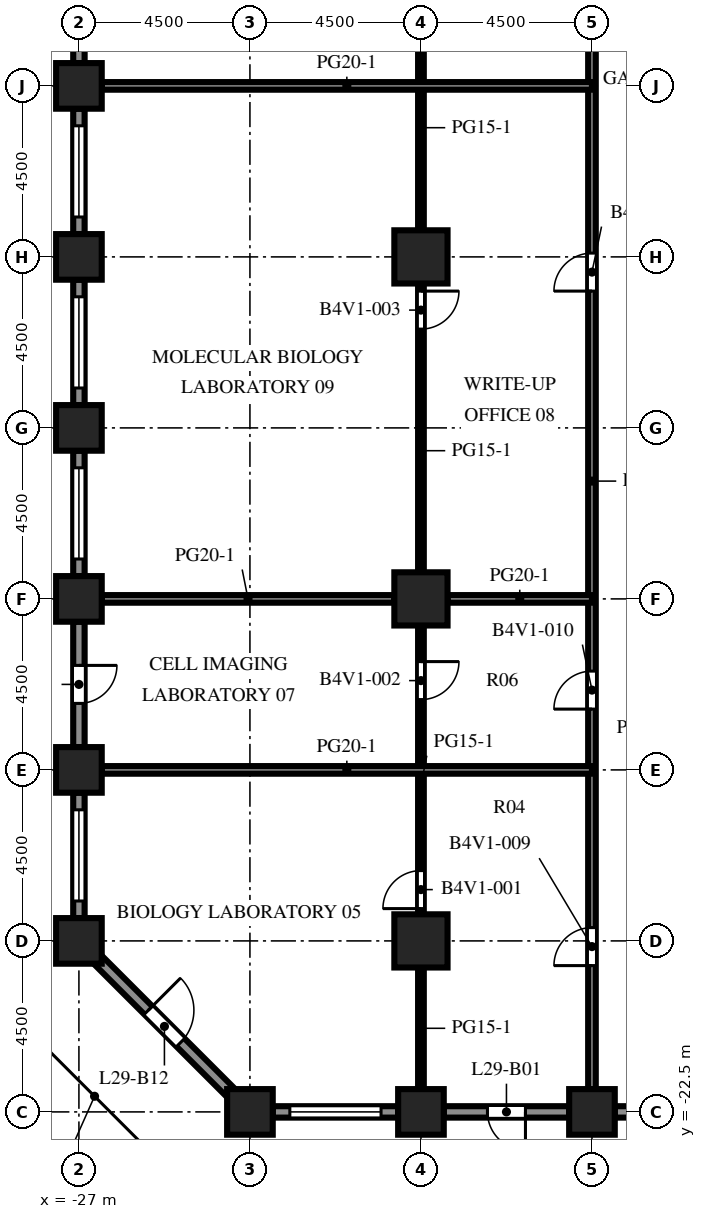
"""IFC4 building model, lengths in metres.
Left out: names, types, materials, properties, quantities, classifications, styles, units other than length and angle.
Written with IfcOpenShell. Run it as: python <this file> out.ifc"""

import sys

from ifc_helpers import new_model, si_unit, direction, frame, frame_2d, origin, origin_2d, place, context, subcontext, project, spatial, rectangle, extrude, element, fill, save


model = new_model("IFC4")
c1 = context("Model", 3, precision=1e-05, world=origin(), true_north=direction((0.0, 1.0)))
c2 = subcontext(c1, "Body", "Model", "MODEL_VIEW")
j1 = project(units=[si_unit("LENGTHUNIT", "METRE"), si_unit("PLANEANGLEUNIT", "RADIAN")], contexts=[c1])
p1 = place(None, origin())
s1 = spatial("IfcSite", under=j1, at=p1, CompositionType="ELEMENT")
p2 = place(p1, origin())
s2 = spatial("IfcBuilding", under=s1, at=p2, CompositionType="ELEMENT")
p3 = place(p2, frame((0.0, 0.0, 129.0)))
s3 = spatial("IfcBuildingStorey", under=s2, at=p3, CompositionType="ELEMENT", Elevation=129.0)
for number, where, z_axis, x_axis in (
    (1, (-27.0, -18.0, 0.0), (0.0, 0.0, 1.0), (1.0, 0.0, 0.0)),
    (2, (-27.0, -13.5, 0.0), (0.0, 0.0, 1.0), (1.0, 0.0, 0.0)),
    (3, (-27.0, -9.0, 0.0), (0.0, 0.0, 1.0), (1.0, 0.0, 0.0)),
    (4, (-27.0, -4.5, 0.0), (0.0, 0.0, 1.0), (1.0, 0.0, 0.0)),
    (5, (-27.0, 0.0, 0.0), (0.0, 0.0, 1.0), (1.0, 0.0, 0.0)),
    (6, (-27.0, 4.5, 0.0), (0.0, 0.0, 1.0), (1.0, 0.0, 0.0)),
    (7, (-22.5, -22.5, 0.0), (0.0, 0.0, 1.0), (1.0, 0.0, 0.0)),
    (8, (-18.0, -22.5, 0.0), (0.0, 0.0, 1.0), (1.0, 0.0, 0.0)),
    (9, (-13.5, -22.5, 0.0), (0.0, 0.0, 1.0), (1.0, 0.0, 0.0)),
):
    element("IfcColumn", number, at=place(p3, frame(where, z_axis=z_axis, x_axis=x_axis)), inside=s3, PredefinedType="COLUMN", context=c2, shape_type="SweptSolid", body=[
        extrude(rectangle(XDim=1.2, YDim=1.2, at=origin_2d()), origin(), (0.0, 0.0, 1.0), 4.1),
    ])
for number, where, z_axis, x_axis in (
    (10, (-18.0, -18.0, 0.0), (0.0, 0.0, 1.0), (1.0, 0.0, 0.0)),
    (11, (-18.0, -9.0, 0.0), (0.0, 0.0, 1.0), (1.0, 0.0, 0.0)),
    (12, (-18.0, 0.0, 0.0), (0.0, 0.0, 1.0), (1.0, 0.0, 0.0)),
):
    element("IfcColumn", number, at=place(p3, frame(where, z_axis=z_axis, x_axis=x_axis)), inside=s3, PredefinedType="COLUMN", context=c2, shape_type="SweptSolid", body=[
        extrude(rectangle(XDim=1.4, YDim=1.4, at=origin_2d()), origin(), (0.0, 0.0, 1.0), 4.1),
    ])
p4 = place(p3, frame((-18.6, -22.5, 0.0), z_axis=(0.0, 0.0, 1.0), x_axis=(-1.0, 0.0, 0.0)))
e13 = element("IfcWall", 13, at=p4, inside=s3, PredefinedType="SOLIDWALL", context=c2, shape_type="SweptSolid", body=[
    extrude(rectangle(XDim=3.3, YDim=0.3, at=frame_2d((1.65, 0.0))), origin(), (0.0, 0.0, 1.0), 2.75),
])
p5 = place(p4, frame((0.45, 0.0, 0.8)))
e14 = element("IfcOpeningElement", 14, at=p5, cuts=e13, PredefinedType="OPENING", context=c2, shape_type="SweptSolid", body=[
    extrude(rectangle(XDim=2.4, YDim=1.7, at=frame_2d((1.2, 0.85))), frame((0.0, 0.16, 0.0), z_axis=(0.0, -1.0, 0.0), x_axis=(1.0, 0.0, 0.0)), (0.0, 0.0, 1.0), 0.32),
])
p6 = place(p3, frame((-14.1, -22.5, 0.0), z_axis=(0.0, 0.0, 1.0), x_axis=(-1.0, 0.0, 0.0)))
e15 = element("IfcWall", 15, at=p6, inside=s3, PredefinedType="SOLIDWALL", context=c2, shape_type="SweptSolid", body=[
    extrude(rectangle(XDim=3.3, YDim=0.3, at=frame_2d((1.65, 0.0))), origin(), (0.0, 0.0, 1.0), 2.75),
])
p7 = place(p6, frame((1.15, 0.0, 0.0)))
e16 = element("IfcOpeningElement", 16, at=p7, cuts=e15, PredefinedType="OPENING", context=c2, shape_type="SweptSolid", body=[
    extrude(rectangle(XDim=1.0, YDim=2.2, at=frame_2d((0.5, 1.1))), frame((0.0, 0.16, 0.0), z_axis=(0.0, -1.0, 0.0), x_axis=(1.0, 0.0, 0.0)), (0.0, 0.0, 1.0), 0.32),
])
p8 = place(p3, frame((-9.6, -22.5, 0.0), z_axis=(0.0, 0.0, 1.0), x_axis=(-1.0, 0.0, 0.0)))
e17 = element("IfcWall", 17, at=p8, inside=s3, PredefinedType="SOLIDWALL", context=c2, shape_type="SweptSolid", body=[
    extrude(rectangle(XDim=3.3, YDim=0.3, at=frame_2d((1.65, 0.0))), origin(), (0.0, 0.0, 1.0), 2.75),
])
p9 = place(p8, frame((1.575, 0.0, 0.8)))
e18 = element("IfcOpeningElement", 18, at=p9, cuts=e17, PredefinedType="OPENING", context=c2, shape_type="SweptSolid", body=[
    extrude(rectangle(XDim=1.2, YDim=1.7, at=frame_2d((0.6, 0.85))), frame((0.0, 0.16, 0.0), z_axis=(0.0, -1.0, 0.0), x_axis=(1.0, 0.0, 0.0)), (0.0, 0.0, 1.0), 0.32),
])
p10 = place(p3, frame((-27.0, 5.1, 0.0), z_axis=(0.0, 0.0, 1.0), x_axis=(0.0, 1.0, 0.0)))
e19 = element("IfcWall", 19, at=p10, inside=s3, PredefinedType="SOLIDWALL", context=c2, shape_type="SweptSolid", body=[
    extrude(rectangle(XDim=3.3, YDim=0.3, at=frame_2d((1.65, 0.0))), origin(), (0.0, 0.0, 1.0), 2.75),
])
p11 = place(p10, frame((0.45, 0.0, 0.8)))
e20 = element("IfcOpeningElement", 20, at=p11, cuts=e19, PredefinedType="OPENING", context=c2, shape_type="SweptSolid", body=[
    extrude(rectangle(XDim=2.4, YDim=1.7, at=frame_2d((1.2, 0.85))), frame((0.0, 0.16, 0.0), z_axis=(0.0, -1.0, 0.0), x_axis=(1.0, 0.0, 0.0)), (0.0, 0.0, 1.0), 0.32),
])
p12 = place(p3, frame((-27.0, 0.6, 0.0), z_axis=(0.0, 0.0, 1.0), x_axis=(0.0, 1.0, 0.0)))
e21 = element("IfcWall", 21, at=p12, inside=s3, PredefinedType="SOLIDWALL", context=c2, shape_type="SweptSolid", body=[
    extrude(rectangle(XDim=3.3, YDim=0.3, at=frame_2d((1.65, 0.0))), origin(), (0.0, 0.0, 1.0), 2.75),
])
p13 = place(p12, frame((0.45, 0.0, 0.8)))
e22 = element("IfcOpeningElement", 22, at=p13, cuts=e21, PredefinedType="OPENING", context=c2, shape_type="SweptSolid", body=[
    extrude(rectangle(XDim=2.4, YDim=1.7, at=frame_2d((1.2, 0.85))), frame((0.0, 0.16, 0.0), z_axis=(0.0, -1.0, 0.0), x_axis=(1.0, 0.0, 0.0)), (0.0, 0.0, 1.0), 0.32),
])
p14 = place(p3, frame((-27.0, -3.9, 0.0), z_axis=(0.0, 0.0, 1.0), x_axis=(0.0, 1.0, 0.0)))
e23 = element("IfcWall", 23, at=p14, inside=s3, PredefinedType="SOLIDWALL", context=c2, shape_type="SweptSolid", body=[
    extrude(rectangle(XDim=3.3, YDim=0.3, at=frame_2d((1.65, 0.0))), origin(), (0.0, 0.0, 1.0), 2.75),
])
p15 = place(p14, frame((0.45, 0.0, 0.8)))
e24 = element("IfcOpeningElement", 24, at=p15, cuts=e23, PredefinedType="OPENING", context=c2, shape_type="SweptSolid", body=[
    extrude(rectangle(XDim=2.4, YDim=1.7, at=frame_2d((1.2, 0.85))), frame((0.0, 0.16, 0.0), z_axis=(0.0, -1.0, 0.0), x_axis=(1.0, 0.0, 0.0)), (0.0, 0.0, 1.0), 0.32),
])
p16 = place(p3, frame((-27.0, -8.4, 0.0), z_axis=(0.0, 0.0, 1.0), x_axis=(0.0, 1.0, 0.0)))
e25 = element("IfcWall", 25, at=p16, inside=s3, PredefinedType="SOLIDWALL", context=c2, shape_type="SweptSolid", body=[
    extrude(rectangle(XDim=3.3, YDim=0.3, at=frame_2d((1.65, 0.0))), origin(), (0.0, 0.0, 1.0), 2.75),
])
p17 = place(p16, frame((0.45, 0.0, 0.8)))
e26 = element("IfcOpeningElement", 26, at=p17, cuts=e25, PredefinedType="OPENING", context=c2, shape_type="SweptSolid", body=[
    extrude(rectangle(XDim=2.4, YDim=1.7, at=frame_2d((1.2, 0.85))), frame((0.0, 0.16, 0.0), z_axis=(0.0, -1.0, 0.0), x_axis=(1.0, 0.0, 0.0)), (0.0, 0.0, 1.0), 0.32),
])
p18 = place(p3, frame((-27.0, -12.9, 0.0), z_axis=(0.0, 0.0, 1.0), x_axis=(0.0, 1.0, 0.0)))
e27 = element("IfcWall", 27, at=p18, inside=s3, PredefinedType="SOLIDWALL", context=c2, shape_type="SweptSolid", body=[
    extrude(rectangle(XDim=3.3, YDim=0.3, at=frame_2d((1.65, 0.0))), origin(), (0.0, 0.0, 1.0), 2.75),
])
p19 = place(p18, frame((1.15, 0.0, 0.0)))
e28 = element("IfcOpeningElement", 28, at=p19, cuts=e27, PredefinedType="OPENING", context=c2, shape_type="SweptSolid", body=[
    extrude(rectangle(XDim=1.0, YDim=2.2, at=frame_2d((0.5, 1.1))), frame((0.0, 0.16, 0.0), z_axis=(0.0, -1.0, 0.0), x_axis=(1.0, 0.0, 0.0)), (0.0, 0.0, 1.0), 0.32),
])
p20 = place(p3, frame((-27.0, -17.4, 0.0), z_axis=(0.0, 0.0, 1.0), x_axis=(0.0, 1.0, 0.0)))
e29 = element("IfcWall", 29, at=p20, inside=s3, PredefinedType="SOLIDWALL", context=c2, shape_type="SweptSolid", body=[
    extrude(rectangle(XDim=3.3, YDim=0.3, at=frame_2d((1.65, 0.0))), origin(), (0.0, 0.0, 1.0), 2.75),
])
p21 = place(p20, frame((0.45, 0.0, 0.8)))
e30 = element("IfcOpeningElement", 30, at=p21, cuts=e29, PredefinedType="OPENING", context=c2, shape_type="SweptSolid", body=[
    extrude(rectangle(XDim=2.4, YDim=1.7, at=frame_2d((1.2, 0.85))), frame((0.0, 0.16, 0.0), z_axis=(0.0, -1.0, 0.0), x_axis=(1.0, 0.0, 0.0)), (0.0, 0.0, 1.0), 0.32),
])
p22 = place(p3, frame((-22.994, -22.006, 0.0), z_axis=(0.0, 0.0, 1.0), x_axis=(-0.707106781187, 0.707106781187, 0.0)))
e31 = element("IfcWall", 31, at=p22, inside=s3, PredefinedType="SOLIDWALL", context=c2, shape_type="SweptSolid", body=[
    extrude(rectangle(XDim=4.967, YDim=0.3, at=frame_2d((2.483, 0.0))), origin(), (0.0, 0.0, 1.0), 2.75),
])
p23 = place(p22, frame((1.884, 0.0, 0.0)))
e32 = element("IfcOpeningElement", 32, at=p23, cuts=e31, PredefinedType="OPENING", context=c2, shape_type="SweptSolid", body=[
    extrude(rectangle(XDim=1.2, YDim=2.2, at=frame_2d((0.6, 1.1))), frame((0.0, 0.16, 0.0), z_axis=(0.0, -1.0, 0.0), x_axis=(1.0, 0.0, 0.0)), (0.0, 0.0, 1.0), 0.32),
])
p24 = place(p3, frame((-18.0, -21.9, 0.0), z_axis=(0.0, 0.0, 1.0), x_axis=(0.0, 1.0, 0.0)))
e33 = element("IfcWall", 33, at=p24, inside=s3, PredefinedType="PARTITIONING", context=c2, shape_type="SweptSolid", body=[
    extrude(rectangle(XDim=3.2, YDim=0.15, at=frame_2d((1.6, 0.0))), origin(), (0.0, 0.0, 1.0), 3.65),
])
p25 = place(p3, frame((-18.0, -17.3, 0.0), z_axis=(0.0, 0.0, 1.0), x_axis=(0.0, 1.0, 0.0)))
e34 = element("IfcWall", 34, at=p25, inside=s3, PredefinedType="PARTITIONING", context=c2, shape_type="SweptSolid", body=[
    extrude(rectangle(XDim=7.6, YDim=0.15, at=frame_2d((3.8, 0.0))), origin(), (0.0, 0.0, 1.0), 3.65),
])
p26 = place(p25, frame((0.15, 0.0, 0.0)))
e35 = element("IfcOpeningElement", 35, at=p26, cuts=e34, PredefinedType="OPENING", context=c2, shape_type="SweptSolid", body=[
    extrude(rectangle(XDim=1.0, YDim=2.1, at=frame_2d((0.5, 1.05))), frame((0.0, 0.085, 0.0), z_axis=(0.0, -1.0, 0.0), x_axis=(1.0, 0.0, 0.0)), (0.0, 0.0, 1.0), 0.17),
])
p27 = place(p25, frame((5.65, 0.0, 0.0)))
e36 = element("IfcOpeningElement", 36, at=p27, cuts=e34, PredefinedType="OPENING", context=c2, shape_type="SweptSolid", body=[
    extrude(rectangle(XDim=1.0, YDim=2.1, at=frame_2d((0.5, 1.05))), frame((0.0, 0.085, 0.0), z_axis=(0.0, -1.0, 0.0), x_axis=(1.0, 0.0, 0.0)), (0.0, 0.0, 1.0), 0.17),
])
p28 = place(p3, frame((-18.0, -8.3, 0.0), z_axis=(0.0, 0.0, 1.0), x_axis=(0.0, 1.0, 0.0)))
e37 = element("IfcWall", 37, at=p28, inside=s3, PredefinedType="PARTITIONING", context=c2, shape_type="SweptSolid", body=[
    extrude(rectangle(XDim=7.6, YDim=0.15, at=frame_2d((3.8, 0.0))), origin(), (0.0, 0.0, 1.0), 3.65),
])
p29 = place(p28, frame((6.4, 0.0, 0.0)))
e38 = element("IfcOpeningElement", 38, at=p29, cuts=e37, PredefinedType="OPENING", context=c2, shape_type="SweptSolid", body=[
    extrude(rectangle(XDim=1.0, YDim=2.1, at=frame_2d((0.5, 1.05))), frame((0.0, 0.085, 0.0), z_axis=(0.0, -1.0, 0.0), x_axis=(1.0, 0.0, 0.0)), (0.0, 0.0, 1.0), 0.17),
])
p30 = place(p3, frame((-18.0, 0.7, 0.0), z_axis=(0.0, 0.0, 1.0), x_axis=(0.0, 1.0, 0.0)))
e39 = element("IfcWall", 39, at=p30, inside=s3, PredefinedType="PARTITIONING", context=c2, shape_type="SweptSolid", body=[
    extrude(rectangle(XDim=7.6, YDim=0.15, at=frame_2d((3.8, 0.0))), origin(), (0.0, 0.0, 1.0), 3.65),
])
p31 = place(p30, frame((5.4, 0.0, 0.0)))
e40 = element("IfcOpeningElement", 40, at=p31, cuts=e39, PredefinedType="OPENING", context=c2, shape_type="SweptSolid", body=[
    extrude(rectangle(XDim=1.0, YDim=2.1, at=frame_2d((0.5, 1.05))), frame((0.0, 0.085, 0.0), z_axis=(0.0, -1.0, 0.0), x_axis=(1.0, 0.0, 0.0)), (0.0, 0.0, 1.0), 0.17),
])
p32 = place(p3, frame((-13.5, -21.9, 0.0), z_axis=(0.0, 0.0, 1.0), x_axis=(0.0, 1.0, 0.0)))
e41 = element("IfcWall", 41, at=p32, inside=s3, PredefinedType="PARTITIONING", context=c2, shape_type="SweptSolid", body=[
    extrude(rectangle(XDim=52.8, YDim=0.2, at=frame_2d((26.4, 0.0))), origin(), (0.0, 0.0, 1.0), 3.65),
])
p33 = place(p32, frame((3.25, 0.0, 0.0)))
e42 = element("IfcOpeningElement", 42, at=p33, cuts=e41, PredefinedType="OPENING", context=c2, shape_type="SweptSolid", body=[
    extrude(rectangle(XDim=1.0, YDim=2.1, at=frame_2d((0.5, 1.05))), frame((0.0, 0.11, 0.0), z_axis=(0.0, -1.0, 0.0), x_axis=(1.0, 0.0, 0.0)), (0.0, 0.0, 1.0), 0.22),
])
p34 = place(p32, frame((10.0, 0.0, 0.0)))
e43 = element("IfcOpeningElement", 43, at=p34, cuts=e41, PredefinedType="OPENING", context=c2, shape_type="SweptSolid", body=[
    extrude(rectangle(XDim=1.0, YDim=2.1, at=frame_2d((0.5, 1.05))), frame((0.0, 0.11, 0.0), z_axis=(0.0, -1.0, 0.0), x_axis=(1.0, 0.0, 0.0)), (0.0, 0.0, 1.0), 0.22),
])
p35 = place(p32, frame((21.0, 0.0, 0.0)))
e44 = element("IfcOpeningElement", 44, at=p35, cuts=e41, PredefinedType="OPENING", context=c2, shape_type="SweptSolid", body=[
    extrude(rectangle(XDim=1.0, YDim=2.1, at=frame_2d((0.5, 1.05))), frame((0.0, 0.11, 0.0), z_axis=(0.0, -1.0, 0.0), x_axis=(1.0, 0.0, 0.0)), (0.0, 0.0, 1.0), 0.22),
])
p36 = place(p32, frame((27.75, 0.0, 0.0)))
e45 = element("IfcOpeningElement", 45, at=p36, cuts=e41, PredefinedType="OPENING", context=c2, shape_type="SweptSolid", body=[
    extrude(rectangle(XDim=1.0, YDim=2.1, at=frame_2d((0.5, 1.05))), frame((0.0, 0.11, 0.0), z_axis=(0.0, -1.0, 0.0), x_axis=(1.0, 0.0, 0.0)), (0.0, 0.0, 1.0), 0.22),
])
p37 = place(p32, frame((34.75, 0.0, 0.0)))
e46 = element("IfcOpeningElement", 46, at=p37, cuts=e41, PredefinedType="OPENING", context=c2, shape_type="SweptSolid", body=[
    extrude(rectangle(XDim=1.0, YDim=2.1, at=frame_2d((0.5, 1.05))), frame((0.0, 0.11, 0.0), z_axis=(0.0, -1.0, 0.0), x_axis=(1.0, 0.0, 0.0)), (0.0, 0.0, 1.0), 0.22),
])
p38 = place(p32, frame((42.0, 0.0, 0.0)))
e47 = element("IfcOpeningElement", 47, at=p38, cuts=e41, PredefinedType="OPENING", context=c2, shape_type="SweptSolid", body=[
    extrude(rectangle(XDim=1.0, YDim=2.1, at=frame_2d((0.5, 1.05))), frame((0.0, 0.11, 0.0), z_axis=(0.0, -1.0, 0.0), x_axis=(1.0, 0.0, 0.0)), (0.0, 0.0, 1.0), 0.22),
])
p39 = place(p32, frame((46.25, 0.0, 0.0)))
e48 = element("IfcOpeningElement", 48, at=p39, cuts=e41, PredefinedType="OPENING", context=c2, shape_type="SweptSolid", body=[
    extrude(rectangle(XDim=1.0, YDim=2.1, at=frame_2d((0.5, 1.05))), frame((0.0, 0.11, 0.0), z_axis=(0.0, -1.0, 0.0), x_axis=(1.0, 0.0, 0.0)), (0.0, 0.0, 1.0), 0.22),
])
p40 = place(p32, frame((51.0, 0.0, 0.0)))
e49 = element("IfcOpeningElement", 49, at=p40, cuts=e41, PredefinedType="OPENING", context=c2, shape_type="SweptSolid", body=[
    extrude(rectangle(XDim=1.0, YDim=2.1, at=frame_2d((0.5, 1.05))), frame((0.0, 0.11, 0.0), z_axis=(0.0, -1.0, 0.0), x_axis=(1.0, 0.0, 0.0)), (0.0, 0.0, 1.0), 0.22),
])
p41 = place(p3, frame((-26.4, -13.5, 0.0), z_axis=(0.0, 0.0, 1.0), x_axis=(1.0, 0.0, 0.0)))
e50 = element("IfcWall", 50, at=p41, inside=s3, PredefinedType="PARTITIONING", context=c2, shape_type="SweptSolid", body=[
    extrude(rectangle(XDim=12.9, YDim=0.2, at=frame_2d((6.45, 0.0))), origin(), (0.0, 0.0, 1.0), 3.65),
])
p42 = place(p3, frame((-26.4, -9.0, 0.0), z_axis=(0.0, 0.0, 1.0), x_axis=(1.0, 0.0, 0.0)))
e51 = element("IfcWall", 51, at=p42, inside=s3, PredefinedType="PARTITIONING", context=c2, shape_type="SweptSolid", body=[
    extrude(rectangle(XDim=7.7, YDim=0.2, at=frame_2d((3.85, 0.0))), origin(), (0.0, 0.0, 1.0), 3.65),
])
p43 = place(p3, frame((-17.3, -9.0, 0.0), z_axis=(0.0, 0.0, 1.0), x_axis=(1.0, 0.0, 0.0)))
e52 = element("IfcWall", 52, at=p43, inside=s3, PredefinedType="PARTITIONING", context=c2, shape_type="SweptSolid", body=[
    extrude(rectangle(XDim=3.8, YDim=0.2, at=frame_2d((1.9, 0.0))), origin(), (0.0, 0.0, 1.0), 3.65),
])
p44 = place(p3, frame((-26.4, 4.5, 0.0), z_axis=(0.0, 0.0, 1.0), x_axis=(1.0, 0.0, 0.0)))
e53 = element("IfcWall", 53, at=p44, inside=s3, PredefinedType="PARTITIONING", context=c2, shape_type="SweptSolid", body=[
    extrude(rectangle(XDim=12.9, YDim=0.2, at=frame_2d((6.45, 0.0))), origin(), (0.0, 0.0, 1.0), 3.65),
])
p45 = place(p5, origin())
e54 = element("IfcWindow", 54, at=p45, inside=s3, PartitioningType="SINGLE_PANEL", PredefinedType="WINDOW", context=c2, shape_type="SweptSolid", body=[
    extrude(rectangle(XDim=2.4, YDim=1.7, at=frame_2d((1.2, 0.85))), frame((0.0, 0.03, 0.0), z_axis=(0.0, -1.0, 0.0), x_axis=(1.0, 0.0, 0.0)), (0.0, 0.0, 1.0), 0.06),
])
fill(e14, e54)
p46 = place(p7, origin())
e55 = element("IfcDoor", 55, at=p46, inside=s3, OperationType="SINGLE_SWING_LEFT", PredefinedType="DOOR", context=c2, shape_type="SweptSolid", body=[
    extrude(rectangle(XDim=1.0, YDim=2.2, at=frame_2d((0.5, 1.1))), frame((0.0, 0.025, 0.0), z_axis=(0.0, -1.0, 0.0), x_axis=(1.0, 0.0, 0.0)), (0.0, 0.0, 1.0), 0.05),
])
fill(e16, e55)
p47 = place(p13, origin())
e56 = element("IfcWindow", 56, at=p47, inside=s3, PartitioningType="SINGLE_PANEL", PredefinedType="WINDOW", context=c2, shape_type="SweptSolid", body=[
    extrude(rectangle(XDim=2.4, YDim=1.7, at=frame_2d((1.2, 0.85))), frame((0.0, 0.03, 0.0), z_axis=(0.0, -1.0, 0.0), x_axis=(1.0, 0.0, 0.0)), (0.0, 0.0, 1.0), 0.06),
])
fill(e22, e56)
p48 = place(p15, origin())
e57 = element("IfcWindow", 57, at=p48, inside=s3, PartitioningType="SINGLE_PANEL", PredefinedType="WINDOW", context=c2, shape_type="SweptSolid", body=[
    extrude(rectangle(XDim=2.4, YDim=1.7, at=frame_2d((1.2, 0.85))), frame((0.0, 0.03, 0.0), z_axis=(0.0, -1.0, 0.0), x_axis=(1.0, 0.0, 0.0)), (0.0, 0.0, 1.0), 0.06),
])
fill(e24, e57)
p49 = place(p17, origin())
e58 = element("IfcWindow", 58, at=p49, inside=s3, PartitioningType="SINGLE_PANEL", PredefinedType="WINDOW", context=c2, shape_type="SweptSolid", body=[
    extrude(rectangle(XDim=2.4, YDim=1.7, at=frame_2d((1.2, 0.85))), frame((0.0, 0.03, 0.0), z_axis=(0.0, -1.0, 0.0), x_axis=(1.0, 0.0, 0.0)), (0.0, 0.0, 1.0), 0.06),
])
fill(e26, e58)
p50 = place(p19, origin())
e59 = element("IfcDoor", 59, at=p50, inside=s3, OperationType="SINGLE_SWING_RIGHT", PredefinedType="DOOR", context=c2, shape_type="SweptSolid", body=[
    extrude(rectangle(XDim=1.0, YDim=2.2, at=frame_2d((0.5, 1.1))), frame((0.0, 0.025, 0.0), z_axis=(0.0, -1.0, 0.0), x_axis=(1.0, 0.0, 0.0)), (0.0, 0.0, 1.0), 0.05),
])
fill(e28, e59)
p51 = place(p21, origin())
e60 = element("IfcWindow", 60, at=p51, inside=s3, PartitioningType="SINGLE_PANEL", PredefinedType="WINDOW", context=c2, shape_type="SweptSolid", body=[
    extrude(rectangle(XDim=2.4, YDim=1.7, at=frame_2d((1.2, 0.85))), frame((0.0, 0.03, 0.0), z_axis=(0.0, -1.0, 0.0), x_axis=(1.0, 0.0, 0.0)), (0.0, 0.0, 1.0), 0.06),
])
fill(e30, e60)
p52 = place(p23, origin())
e61 = element("IfcDoor", 61, at=p52, inside=s3, OperationType="SINGLE_SWING_RIGHT", PredefinedType="DOOR", context=c2, shape_type="SweptSolid", body=[
    extrude(rectangle(XDim=1.2, YDim=2.2, at=frame_2d((0.6, 1.1))), frame((0.0, 0.025, 0.0), z_axis=(0.0, -1.0, 0.0), x_axis=(1.0, 0.0, 0.0)), (0.0, 0.0, 1.0), 0.05),
])
fill(e32, e61)
p53 = place(p26, origin())
e62 = element("IfcDoor", 62, at=p53, inside=s3, OperationType="SINGLE_SWING_LEFT", PredefinedType="DOOR", context=c2, shape_type="SweptSolid", body=[
    extrude(rectangle(XDim=1.0, YDim=2.1, at=frame_2d((0.5, 1.05))), frame((0.0, 0.025, 0.0), z_axis=(0.0, -1.0, 0.0), x_axis=(1.0, 0.0, 0.0)), (0.0, 0.0, 1.0), 0.05),
])
fill(e35, e62)
p54 = place(p27, origin())
e63 = element("IfcDoor", 63, at=p54, inside=s3, OperationType="SINGLE_SWING_RIGHT", PredefinedType="DOOR", context=c2, shape_type="SweptSolid", body=[
    extrude(rectangle(XDim=1.0, YDim=2.1, at=frame_2d((0.5, 1.05))), frame((0.0, 0.025, 0.0), z_axis=(0.0, -1.0, 0.0), x_axis=(1.0, 0.0, 0.0)), (0.0, 0.0, 1.0), 0.05),
])
fill(e36, e63)
p55 = place(p29, origin())
e64 = element("IfcDoor", 64, at=p55, inside=s3, OperationType="SINGLE_SWING_RIGHT", PredefinedType="DOOR", context=c2, shape_type="SweptSolid", body=[
    extrude(rectangle(XDim=1.0, YDim=2.1, at=frame_2d((0.5, 1.05))), frame((0.0, 0.025, 0.0), z_axis=(0.0, -1.0, 0.0), x_axis=(1.0, 0.0, 0.0)), (0.0, 0.0, 1.0), 0.05),
])
fill(e38, e64)
p56 = place(p33, origin())
e65 = element("IfcDoor", 65, at=p56, inside=s3, OperationType="SINGLE_SWING_LEFT", PredefinedType="DOOR", context=c2, shape_type="SweptSolid", body=[
    extrude(rectangle(XDim=1.0, YDim=2.1, at=frame_2d((0.5, 1.05))), frame((0.0, 0.025, 0.0), z_axis=(0.0, -1.0, 0.0), x_axis=(1.0, 0.0, 0.0)), (0.0, 0.0, 1.0), 0.05),
])
fill(e42, e65)
p57 = place(p34, origin())
e66 = element("IfcDoor", 66, at=p57, inside=s3, OperationType="SINGLE_SWING_LEFT", PredefinedType="DOOR", context=c2, shape_type="SweptSolid", body=[
    extrude(rectangle(XDim=1.0, YDim=2.1, at=frame_2d((0.5, 1.05))), frame((0.0, 0.025, 0.0), z_axis=(0.0, -1.0, 0.0), x_axis=(1.0, 0.0, 0.0)), (0.0, 0.0, 1.0), 0.05),
])
fill(e43, e66)
p58 = place(p35, origin())
e67 = element("IfcDoor", 67, at=p58, inside=s3, OperationType="SINGLE_SWING_LEFT", PredefinedType="DOOR", context=c2, shape_type="SweptSolid", body=[
    extrude(rectangle(XDim=1.0, YDim=2.1, at=frame_2d((0.5, 1.05))), frame((0.0, 0.025, 0.0), z_axis=(0.0, -1.0, 0.0), x_axis=(1.0, 0.0, 0.0)), (0.0, 0.0, 1.0), 0.05),
])
fill(e44, e67)
save(model, sys.argv[1])
